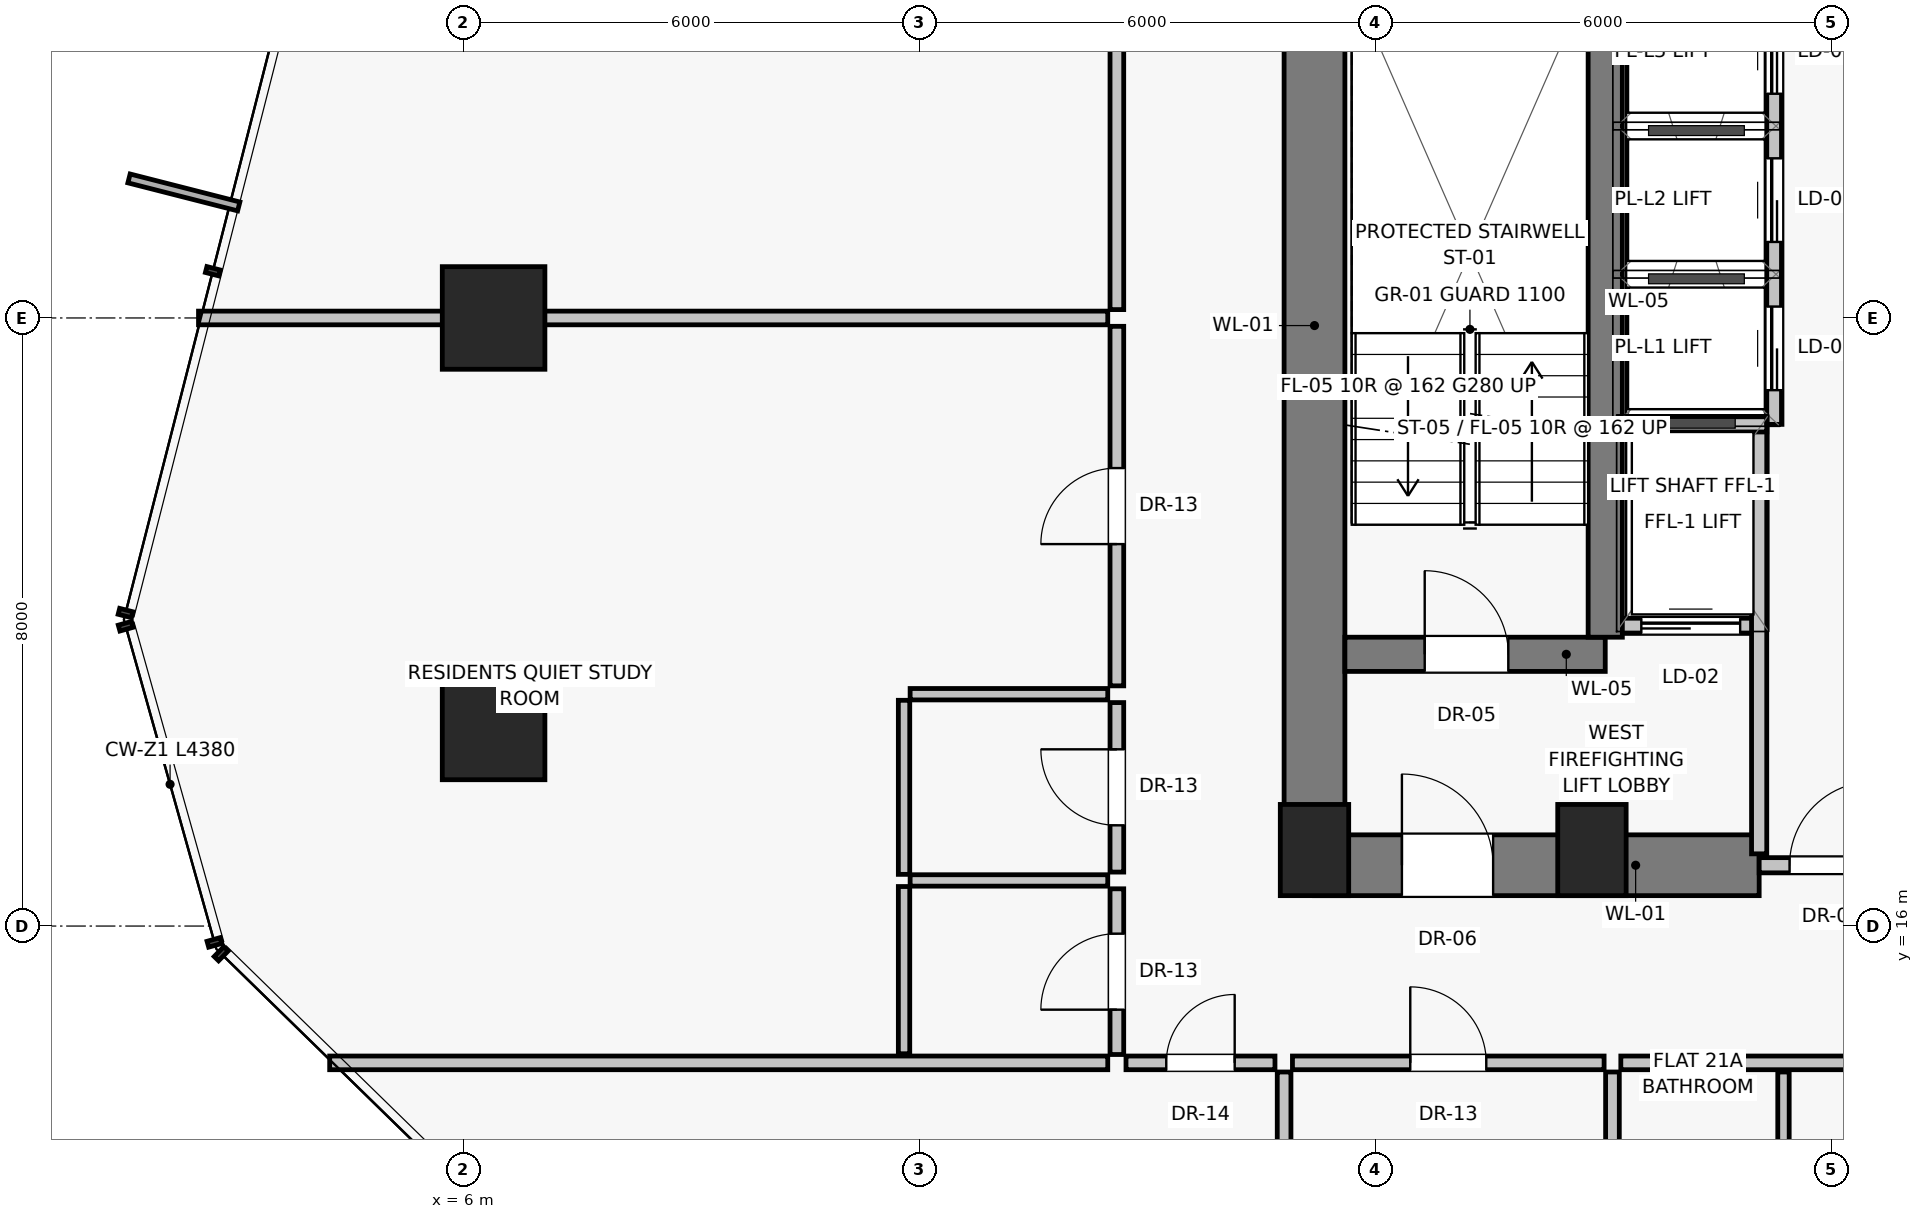
"""IFC4 building model, lengths in metres.
Left out: names, types, materials, properties, quantities, classifications, styles, units other than length and angle.
Written with IfcOpenShell. Run it as: python <this file> out.ifc"""

import sys

from ifc_helpers import new_model, si_unit, direction, frame, frame_2d, origin, origin_2d, place, context, subcontext, project, spatial, rectangle, extrude, source, transform, mapped, element, fill, save


model = new_model("IFC4")
c1 = context("Model", 3, precision=1e-05, world=origin(), true_north=direction((0.0, 1.0)))
c2 = subcontext(c1, "Body", "Model", "MODEL_VIEW")
j1 = project(units=[si_unit("LENGTHUNIT", "METRE"), si_unit("PLANEANGLEUNIT", "RADIAN")], contexts=[c1])
p1 = place(None, origin())
s1 = spatial("IfcSite", under=j1, at=p1, CompositionType="ELEMENT")
p2 = place(p1, origin())
s2 = spatial("IfcBuilding", under=s1, at=p2, CompositionType="ELEMENT")
p3 = place(p2, frame((0.0, 0.0, 77.1)))
s3 = spatial("IfcBuildingStorey", under=s2, at=p3, CompositionType="ELEMENT", Elevation=77.1)
for number, where, z_axis, x_axis in (
    (1, (17.2, 17.0, 0.0), (0.0, 0.0, 1.0), (1.0, 0.0, 0.0)),
    (2, (20.85, 17.0, 0.0), (0.0, 0.0, 1.0), (1.0, 0.0, 0.0)),
):
    element("IfcColumn", number, at=place(p3, frame(where, z_axis=z_axis, x_axis=x_axis)), inside=s3, PredefinedType="PILASTER", context=c2, shape_type="SweptSolid", body=[
        extrude(rectangle(XDim=0.9, YDim=1.2, at=origin_2d()), origin(), (0.0, 0.0, 1.0), 3.25),
    ])
for number, where, z_axis, x_axis in (
    (3, (6.4, 24.0, 0.0), (0.0, 0.0, 1.0), (1.0, 0.0, 0.0)),
    (4, (6.4, 18.6, 0.0), (0.0, 0.0, 1.0), (1.0, 0.0, 0.0)),
):
    element("IfcColumn", number, at=place(p3, frame(where, z_axis=z_axis, x_axis=x_axis)), inside=s3, PredefinedType="COLUMN", context=c2, shape_type="SweptSolid", body=[
        extrude(rectangle(XDim=1.35, YDim=1.35, at=origin_2d()), origin(), (0.0, 0.0, 1.0), 3.25),
    ])
p4 = place(p3, frame((17.2, 16.8, 0.0), z_axis=(0.0, 0.0, 1.0), x_axis=(0.0, 1.0, 0.0)))
e5 = element("IfcWall", 5, at=p4, inside=s3, PredefinedType="SHEAR", context=c2, shape_type="SweptSolid", body=[
    extrude(rectangle(XDim=14.2, YDim=0.8, at=frame_2d((7.1, 0.0))), origin(), (0.0, 0.0, 1.0), 2.93),
])
p5 = place(p3, frame((17.2, 16.8, 0.0), z_axis=(0.0, 0.0, 1.0), x_axis=(1.0, 0.0, 0.0)))
e6 = element("IfcWall", 6, at=p5, inside=s3, PredefinedType="SHEAR", context=c2, shape_type="SweptSolid", body=[
    extrude(rectangle(XDim=5.85, YDim=0.8, at=frame_2d((2.925, 0.0))), origin(), (0.0, 0.0, 1.0), 2.93),
])
p6 = place(p5, frame((1.15, 0.0, 0.0)))
e7 = element("IfcOpeningElement", 7, at=p6, cuts=e6, PredefinedType="OPENING", context=c2, shape_type="SweptSolid", body=[
    extrude(rectangle(XDim=1.2, YDim=2.03, at=frame_2d((0.6, 1.015))), frame((0.0, 0.41, 0.0), z_axis=(0.0, -1.0, 0.0), x_axis=(1.0, 0.0, 0.0)), (0.0, 0.0, 1.0), 0.82),
])
p7 = place(p3, frame((23.05, 16.8, 0.0), z_axis=(0.0, 0.0, 1.0), x_axis=(1.0, 0.0, 0.0)))
e8 = element("IfcWall", 8, at=p7, inside=s3, PredefinedType="SOLIDWALL", context=c2, shape_type="SweptSolid", body=[
    extrude(rectangle(XDim=1.9, YDim=0.2, at=frame_2d((0.95, 0.0))), origin(), (0.0, 0.0, 1.0), 2.08),
])
p8 = place(p7, frame((0.4, 0.0, 0.0)))
e9 = element("IfcOpeningElement", 9, at=p8, cuts=e8, PredefinedType="OPENING", context=c2, shape_type="SweptSolid", body=[
    extrude(rectangle(XDim=1.1, YDim=2.03, at=frame_2d((0.55, 1.015))), frame((0.0, 0.11, 0.0), z_axis=(0.0, -1.0, 0.0), x_axis=(1.0, 0.0, 0.0)), (0.0, 0.0, 1.0), 0.22),
])
p9 = place(p3, frame((17.6, 19.575, 0.0), z_axis=(0.0, 0.0, 1.0), x_axis=(1.0, 0.0, 0.0)))
e10 = element("IfcWall", 10, at=p9, inside=s3, PredefinedType="SHEAR", context=c2, shape_type="SweptSolid", body=[
    extrude(rectangle(XDim=3.425, YDim=0.45, at=frame_2d((1.712, 0.0))), origin(), (0.0, 0.0, 1.0), 2.93),
])
p10 = place(p9, frame((1.05, 0.0, 0.0)))
e11 = element("IfcOpeningElement", 11, at=p10, cuts=e10, PredefinedType="OPENING", context=c2, shape_type="SweptSolid", body=[
    extrude(rectangle(XDim=1.1, YDim=2.03, at=frame_2d((0.55, 1.015))), frame((0.0, 0.235, 0.0), z_axis=(0.0, -1.0, 0.0), x_axis=(1.0, 0.0, 0.0)), (0.0, 0.0, 1.0), 0.47),
])
p11 = place(p3, frame((21.2, 19.95, 0.0), z_axis=(0.0, 0.0, 1.0), x_axis=(1.0, 0.0, 0.0)))
e12 = element("IfcWall", 12, at=p11, inside=s3, PredefinedType="SOLIDWALL", context=c2, shape_type="SweptSolid", body=[
    extrude(rectangle(XDim=1.85, YDim=0.2, at=frame_2d((0.925, 0.0))), origin(), (0.0, 0.0, 1.0), 2.93),
])
p12 = place(p11, frame((0.3, 0.0, 0.0)))
e13 = element("IfcOpeningElement", 13, at=p12, cuts=e12, PredefinedType="OPENING", context=c2, shape_type="SweptSolid", body=[
    extrude(rectangle(XDim=1.3, YDim=2.25, at=frame_2d((0.65, 1.125))), frame((0.0, 0.11, 0.0), z_axis=(0.0, -1.0, 0.0), x_axis=(1.0, 0.0, 0.0)), (0.0, 0.0, 1.0), 0.22),
])
p13 = place(p3, frame((21.025, 19.8, 0.0), z_axis=(0.0, 0.0, 1.0), x_axis=(0.0, 1.0, 0.0)))
e14 = element("IfcWall", 14, at=p13, inside=s3, PredefinedType="SHEAR", context=c2, shape_type="SweptSolid", body=[
    extrude(rectangle(XDim=8.825, YDim=0.45, at=frame_2d((4.413, 0.0))), origin(), (0.0, 0.0, 1.0), 2.93),
])
p14 = place(p3, frame((23.05, 16.95, 0.0), z_axis=(0.0, 0.0, 1.0), x_axis=(0.0, 1.0, 0.0)))
e15 = element("IfcWall", 15, at=p14, inside=s3, PredefinedType="SOLIDWALL", context=c2, shape_type="SweptSolid", body=[
    extrude(rectangle(XDim=5.6, YDim=0.2, at=frame_2d((2.8, 0.0))), origin(), (0.0, 0.0, 1.0), 2.93),
])
p15 = place(p3, frame((21.2, 22.6, 0.0), z_axis=(0.0, 0.0, 1.0), x_axis=(1.0, 0.0, 0.0)))
e16 = element("IfcWall", 16, at=p15, inside=s3, PredefinedType="SOLIDWALL", context=c2, shape_type="SweptSolid", body=[
    extrude(rectangle(XDim=1.95, YDim=0.2, at=frame_2d((0.975, 0.0))), origin(), (0.0, 0.0, 1.0), 2.93),
])
p16 = place(p3, frame((23.25, 22.6, 0.0), z_axis=(0.0, 0.0, 1.0), x_axis=(0.0, 1.0, 0.0)))
e17 = element("IfcWall", 17, at=p16, inside=s3, PredefinedType="SOLIDWALL", context=c2, shape_type="SweptSolid", body=[
    extrude(rectangle(XDim=5.95, YDim=0.2, at=frame_2d((2.975, 0.0))), origin(), (0.0, 0.0, 1.0), 2.93),
])
p17 = place(p16, frame((0.45, 0.0, 0.0)))
e18 = element("IfcOpeningElement", 18, at=p17, cuts=e17, PredefinedType="OPENING", context=c2, shape_type="SweptSolid", body=[
    extrude(rectangle(XDim=1.1, YDim=2.08, at=frame_2d((0.55, 1.04))), frame((0.0, 0.11, 0.0), z_axis=(0.0, -1.0, 0.0), x_axis=(1.0, 0.0, 0.0)), (0.0, 0.0, 1.0), 0.22),
])
p18 = place(p16, frame((2.4, 0.0, 0.0)))
e19 = element("IfcOpeningElement", 19, at=p18, cuts=e17, PredefinedType="OPENING", context=c2, shape_type="SweptSolid", body=[
    extrude(rectangle(XDim=1.1, YDim=2.08, at=frame_2d((0.55, 1.04))), frame((0.0, 0.11, 0.0), z_axis=(0.0, -1.0, 0.0), x_axis=(1.0, 0.0, 0.0)), (0.0, 0.0, 1.0), 0.22),
])
p19 = place(p16, frame((4.35, 0.0, 0.0)))
e20 = element("IfcOpeningElement", 20, at=p19, cuts=e17, PredefinedType="OPENING", context=c2, shape_type="SweptSolid", body=[
    extrude(rectangle(XDim=1.1, YDim=2.08, at=frame_2d((0.55, 1.04))), frame((0.0, 0.11, 0.0), z_axis=(0.0, -1.0, 0.0), x_axis=(1.0, 0.0, 0.0)), (0.0, 0.0, 1.0), 0.22),
])
p20 = place(p3, frame((16.8, 14.08, 0.0), z_axis=(0.0, 0.0, 1.0), x_axis=(0.0, -1.0, 0.0)))
e21 = element("IfcWall", 21, at=p20, inside=s3, PredefinedType="PARTITIONING", context=c2, shape_type="SweptSolid", body=[
    extrude(rectangle(XDim=11.702, YDim=0.18, at=frame_2d((5.851, 0.0))), origin(), (0.0, 0.0, 1.0), 2.93),
])
p21 = place(p3, frame((16.91, 14.2, 0.0), z_axis=(0.0, 0.0, 1.0), x_axis=(1.0, 0.0, 0.0)))
e22 = element("IfcWall", 22, at=p21, inside=s3, PredefinedType="PARTITIONING", context=c2, shape_type="SweptSolid", body=[
    extrude(rectangle(XDim=4.1, YDim=0.18, at=frame_2d((2.05, 0.0))), origin(), (0.0, 0.0, 1.0), 2.93),
])
p22 = place(p21, frame((1.55, 0.0, 0.0)))
e23 = element("IfcOpeningElement", 23, at=p22, cuts=e22, PredefinedType="OPENING", context=c2, shape_type="SweptSolid", body=[
    extrude(rectangle(XDim=1.0, YDim=2.01, at=frame_2d((0.5, 1.005))), frame((0.0, 0.1, 0.0), z_axis=(0.0, -1.0, 0.0), x_axis=(1.0, 0.0, 0.0)), (0.0, 0.0, 1.0), 0.2),
])
p23 = place(p3, frame((21.23, 14.2, 0.0), z_axis=(0.0, 0.0, 1.0), x_axis=(1.0, 0.0, 0.0)))
e24 = element("IfcWall", 24, at=p23, inside=s3, PredefinedType="PARTITIONING", context=c2, shape_type="SweptSolid", body=[
    extrude(rectangle(XDim=9.86, YDim=0.18, at=frame_2d((4.93, 0.0))), origin(), (0.0, 0.0, 1.0), 2.93),
])
p24 = place(p23, frame((3.276, 0.0, 0.0)))
e25 = element("IfcOpeningElement", 25, at=p24, cuts=e24, PredefinedType="OPENING", context=c2, shape_type="SweptSolid", body=[
    extrude(rectangle(XDim=0.95, YDim=2.02, at=frame_2d((0.475, 1.01))), frame((0.0, 0.1, 0.0), z_axis=(0.0, -1.0, 0.0), x_axis=(1.0, 0.0, 0.0)), (0.0, 0.0, 1.0), 0.2),
])
p25 = place(p3, frame((21.12, 14.08, 0.0), z_axis=(0.0, 0.0, 1.0), x_axis=(0.0, -1.0, 0.0)))
e26 = element("IfcWall", 26, at=p25, inside=s3, PredefinedType="PARTITIONING", context=c2, shape_type="SweptSolid", body=[
    extrude(rectangle(XDim=1.8, YDim=0.18, at=frame_2d((0.9, 0.0))), origin(), (0.0, 0.0, 1.0), 2.93),
])
p26 = place(p3, frame((23.37, 14.08, 0.0), z_axis=(0.0, 0.0, 1.0), x_axis=(0.0, -1.0, 0.0)))
e27 = element("IfcWall", 27, at=p26, inside=s3, PredefinedType="PARTITIONING", context=c2, shape_type="SweptSolid", body=[
    extrude(rectangle(XDim=1.8, YDim=0.15, at=frame_2d((0.9, 0.0))), origin(), (0.0, 0.0, 1.0), 2.93),
])
p27 = place(p3, frame((14.48, 14.2, 0.0), z_axis=(0.0, 0.0, 1.0), x_axis=(-1.0, 0.0, 0.0)))
e28 = element("IfcWall", 28, at=p27, inside=s3, PredefinedType="PARTITIONING", context=c2, shape_type="SweptSolid", body=[
    extrude(rectangle(XDim=10.237, YDim=0.18, at=frame_2d((5.118, 0.0))), origin(), (0.0, 0.0, 1.0), 2.93),
])
p28 = place(p3, frame((14.6, 14.31, 0.0), z_axis=(0.0, 0.0, 1.0), x_axis=(0.0, 1.0, 0.0)))
e29 = element("IfcWall", 29, at=p28, inside=s3, PredefinedType="PARTITIONING", context=c2, shape_type="SweptSolid", body=[
    extrude(rectangle(XDim=2.18, YDim=0.18, at=frame_2d((1.09, 0.0))), origin(), (0.0, 0.0, 1.0), 2.93),
])
p29 = place(p28, frame((0.59, 0.0, 0.0)))
e30 = element("IfcOpeningElement", 30, at=p29, cuts=e29, PredefinedType="OPENING", context=c2, shape_type="SweptSolid", body=[
    extrude(rectangle(XDim=1.0, YDim=2.01, at=frame_2d((0.5, 1.005))), frame((0.0, 0.1, 0.0), z_axis=(0.0, -1.0, 0.0), x_axis=(1.0, 0.0, 0.0)), (0.0, 0.0, 1.0), 0.2),
])
p30 = place(p3, frame((14.6, 16.71, 0.0), z_axis=(0.0, 0.0, 1.0), x_axis=(0.0, 1.0, 0.0)))
e31 = element("IfcWall", 31, at=p30, inside=s3, PredefinedType="PARTITIONING", context=c2, shape_type="SweptSolid", body=[
    extrude(rectangle(XDim=2.23, YDim=0.18, at=frame_2d((1.115, 0.0))), origin(), (0.0, 0.0, 1.0), 2.93),
])
p31 = place(p30, frame((0.615, 0.0, 0.0)))
e32 = element("IfcOpeningElement", 32, at=p31, cuts=e31, PredefinedType="OPENING", context=c2, shape_type="SweptSolid", body=[
    extrude(rectangle(XDim=1.0, YDim=2.01, at=frame_2d((0.5, 1.005))), frame((0.0, 0.1, 0.0), z_axis=(0.0, -1.0, 0.0), x_axis=(1.0, 0.0, 0.0)), (0.0, 0.0, 1.0), 0.2),
])
p32 = place(p3, frame((14.6, 19.16, 0.0), z_axis=(0.0, 0.0, 1.0), x_axis=(0.0, 1.0, 0.0)))
e33 = element("IfcWall", 33, at=p32, inside=s3, PredefinedType="PARTITIONING", context=c2, shape_type="SweptSolid", body=[
    extrude(rectangle(XDim=4.73, YDim=0.18, at=frame_2d((2.365, 0.0))), origin(), (0.0, 0.0, 1.0), 2.93),
])
p33 = place(p32, frame((1.865, 0.0, 0.0)))
e34 = element("IfcOpeningElement", 34, at=p33, cuts=e33, PredefinedType="OPENING", context=c2, shape_type="SweptSolid", body=[
    extrude(rectangle(XDim=1.0, YDim=2.01, at=frame_2d((0.5, 1.005))), frame((0.0, 0.1, 0.0), z_axis=(0.0, -1.0, 0.0), x_axis=(1.0, 0.0, 0.0)), (0.0, 0.0, 1.0), 0.2),
])
p34 = place(p3, frame((14.6, 24.11, 0.0), z_axis=(0.0, 0.0, 1.0), x_axis=(0.0, 1.0, 0.0)))
e35 = element("IfcWall", 35, at=p34, inside=s3, PredefinedType="PARTITIONING", context=c2, shape_type="SweptSolid", body=[
    extrude(rectangle(XDim=9.38, YDim=0.18, at=frame_2d((4.69, 0.0))), origin(), (0.0, 0.0, 1.0), 2.93),
])
p35 = place(p34, frame((4.19, 0.0, 0.0)))
e36 = element("IfcOpeningElement", 36, at=p35, cuts=e35, PredefinedType="OPENING", context=c2, shape_type="SweptSolid", body=[
    extrude(rectangle(XDim=1.0, YDim=2.01, at=frame_2d((0.5, 1.005))), frame((0.0, 0.1, 0.0), z_axis=(0.0, -1.0, 0.0), x_axis=(1.0, 0.0, 0.0)), (0.0, 0.0, 1.0), 0.2),
])
for number, where, z_axis, x_axis in (
    (37, (14.48, 16.6, 0.0), (0.0, 0.0, 1.0), (-1.0, 0.0, 0.0)),
    (38, (14.48, 19.05, 0.0), (0.0, 0.0, 1.0), (-1.0, 0.0, 0.0)),
):
    element("IfcWall", number, at=place(p3, frame(where, z_axis=z_axis, x_axis=x_axis)), inside=s3, PredefinedType="PARTITIONING", context=c2, shape_type="SweptSolid", body=[
        extrude(rectangle(XDim=2.6, YDim=0.15, at=frame_2d((1.3, 0.0))), origin(), (0.0, 0.0, 1.0), 2.93),
    ])
p36 = place(p3, frame((11.8, 14.32, 0.0), z_axis=(0.0, 0.0, 1.0), x_axis=(0.0, 1.0, 0.0)))
e39 = element("IfcWall", 39, at=p36, inside=s3, PredefinedType="PARTITIONING", context=c2, shape_type="SweptSolid", body=[
    extrude(rectangle(XDim=2.2, YDim=0.15, at=frame_2d((1.1, 0.0))), origin(), (0.0, 0.0, 1.0), 2.93),
])
p37 = place(p3, frame((11.8, 16.68, 0.0), z_axis=(0.0, 0.0, 1.0), x_axis=(0.0, 1.0, 0.0)))
e40 = element("IfcWall", 40, at=p37, inside=s3, PredefinedType="PARTITIONING", context=c2, shape_type="SweptSolid", body=[
    extrude(rectangle(XDim=2.29, YDim=0.15, at=frame_2d((1.145, 0.0))), origin(), (0.0, 0.0, 1.0), 2.51),
])
p38 = place(p3, frame((14.48, 24.0, 0.0), z_axis=(0.0, 0.0, 1.0), x_axis=(-1.0, 0.0, 0.0)))
e41 = element("IfcWall", 41, at=p38, inside=s3, PredefinedType="PARTITIONING", context=c2, shape_type="SweptSolid", body=[
    extrude(rectangle(XDim=11.962, YDim=0.18, at=frame_2d((5.981, 0.0))), origin(), (0.0, 0.0, 1.0), 2.93),
])
p39 = place(p3, frame((14.72, 14.2, 0.0), z_axis=(0.0, 0.0, 1.0), x_axis=(1.0, 0.0, 0.0)))
e42 = element("IfcWall", 42, at=p39, inside=s3, PredefinedType="PARTITIONING", context=c2, shape_type="SweptSolid", body=[
    extrude(rectangle(XDim=1.96, YDim=0.18, at=frame_2d((0.98, 0.0))), origin(), (0.0, 0.0, 1.0), 2.93),
])
p40 = place(p39, frame((0.53, 0.0, 0.0)))
e43 = element("IfcOpeningElement", 43, at=p40, cuts=e42, PredefinedType="OPENING", context=c2, shape_type="SweptSolid", body=[
    extrude(rectangle(XDim=0.9, YDim=2.01, at=frame_2d((0.45, 1.005))), frame((0.0, 0.1, 0.0), z_axis=(0.0, -1.0, 0.0), x_axis=(1.0, 0.0, 0.0)), (0.0, 0.0, 1.0), 0.2),
])
m1 = source(origin(), c2, "Body", "SweptSolid", [
    extrude(rectangle(XDim=1.2, YDim=2.03, at=frame_2d((0.6, 1.015))), frame((0.0, 0.025, 0.0), z_axis=(0.0, -1.0, 0.0), x_axis=(1.0, 0.0, 0.0)), (0.0, 0.0, 1.0), 0.05),
])
p41 = place(p6, origin())
e44 = element("IfcDoor", 44, at=p41, inside=s3, OperationType="SINGLE_SWING_LEFT", PredefinedType="DOOR", context=c2, shape_type="MappedRepresentation", body=[
    mapped(m1, transform((0.0, 0.0, 0.0), scale=1.0)),
])
fill(e7, e44)
m2 = source(origin(), c2, "Body", "SweptSolid", [
    extrude(rectangle(XDim=1.1, YDim=2.03, at=frame_2d((0.55, 1.015))), frame((0.0, 0.025, 0.0), z_axis=(0.0, -1.0, 0.0), x_axis=(1.0, 0.0, 0.0)), (0.0, 0.0, 1.0), 0.05),
])
p42 = place(p8, origin())
e45 = element("IfcDoor", 45, at=p42, inside=s3, OperationType="SINGLE_SWING_RIGHT", PredefinedType="DOOR", context=c2, shape_type="MappedRepresentation", body=[
    mapped(m2, transform((0.0, 0.0, 0.0), scale=1.0)),
])
fill(e9, e45)
p43 = place(p10, origin())
e46 = element("IfcDoor", 46, at=p43, inside=s3, OperationType="SINGLE_SWING_LEFT", PredefinedType="DOOR", context=c2, shape_type="MappedRepresentation", body=[
    mapped(m2, transform((0.0, 0.0, 0.0), scale=1.0)),
])
fill(e11, e46)
m3 = source(origin(), c2, "Body", "SweptSolid", [
    extrude(rectangle(XDim=1.3, YDim=2.25, at=frame_2d((0.65, 1.125))), frame((0.0, 0.025, 0.0), z_axis=(0.0, -1.0, 0.0), x_axis=(1.0, 0.0, 0.0)), (0.0, 0.0, 1.0), 0.05),
])
p44 = place(p12, origin())
e47 = element("IfcDoor", 47, at=p44, inside=s3, OperationType="SLIDING_TO_LEFT", PredefinedType="DOOR", context=c2, shape_type="MappedRepresentation", body=[
    mapped(m3, transform((0.0, 0.0, 0.0), scale=1.0)),
])
fill(e13, e47)
m4 = source(origin(), c2, "Body", "SweptSolid", [
    extrude(rectangle(XDim=1.1, YDim=2.08, at=frame_2d((0.55, 1.04))), frame((0.0, 0.025, 0.0), z_axis=(0.0, -1.0, 0.0), x_axis=(1.0, 0.0, 0.0)), (0.0, 0.0, 1.0), 0.05),
])
p45 = place(p17, origin())
e48 = element("IfcDoor", 48, at=p45, inside=s3, OperationType="SLIDING_TO_LEFT", PredefinedType="DOOR", context=c2, shape_type="MappedRepresentation", body=[
    mapped(m4, transform((0.0, 0.0, 0.0), scale=1.0)),
])
fill(e18, e48)
p46 = place(p18, origin())
e49 = element("IfcDoor", 49, at=p46, inside=s3, OperationType="SLIDING_TO_LEFT", PredefinedType="DOOR", context=c2, shape_type="MappedRepresentation", body=[
    mapped(m4, transform((0.0, 0.0, 0.0), scale=1.0)),
])
fill(e19, e49)
p47 = place(p19, origin())
e50 = element("IfcDoor", 50, at=p47, inside=s3, OperationType="SLIDING_TO_LEFT", PredefinedType="DOOR", context=c2, shape_type="MappedRepresentation", body=[
    mapped(m4, transform((0.0, 0.0, 0.0), scale=1.0)),
])
fill(e20, e50)
m5 = source(origin(), c2, "Body", "SweptSolid", [
    extrude(rectangle(XDim=1.0, YDim=2.01, at=frame_2d((0.5, 1.005))), frame((0.0, 0.025, 0.0), z_axis=(0.0, -1.0, 0.0), x_axis=(1.0, 0.0, 0.0)), (0.0, 0.0, 1.0), 0.05),
])
p48 = place(p22, origin())
e51 = element("IfcDoor", 51, at=p48, inside=s3, OperationType="SINGLE_SWING_LEFT", PredefinedType="DOOR", context=c2, shape_type="MappedRepresentation", body=[
    mapped(m5, transform((0.0, 0.0, 0.0), scale=1.0)),
])
fill(e23, e51)
p49 = place(p29, origin())
e52 = element("IfcDoor", 52, at=p49, inside=s3, OperationType="SINGLE_SWING_LEFT", PredefinedType="DOOR", context=c2, shape_type="MappedRepresentation", body=[
    mapped(m5, transform((0.0, 0.0, 0.0), scale=1.0)),
])
fill(e30, e52)
p50 = place(p31, origin())
e53 = element("IfcDoor", 53, at=p50, inside=s3, OperationType="SINGLE_SWING_RIGHT", PredefinedType="DOOR", context=c2, shape_type="MappedRepresentation", body=[
    mapped(m5, transform((0.0, 0.0, 0.0), scale=1.0)),
])
fill(e32, e53)
p51 = place(p33, origin())
e54 = element("IfcDoor", 54, at=p51, inside=s3, OperationType="SINGLE_SWING_LEFT", PredefinedType="DOOR", context=c2, shape_type="MappedRepresentation", body=[
    mapped(m5, transform((0.0, 0.0, 0.0), scale=1.0)),
])
fill(e34, e54)
m6 = source(origin(), c2, "Body", "SweptSolid", [
    extrude(rectangle(XDim=0.9, YDim=2.01, at=frame_2d((0.45, 1.005))), frame((0.0, 0.025, 0.0), z_axis=(0.0, -1.0, 0.0), x_axis=(1.0, 0.0, 0.0)), (0.0, 0.0, 1.0), 0.05),
])
p52 = place(p40, origin())
e55 = element("IfcDoor", 55, at=p52, inside=s3, OperationType="SINGLE_SWING_RIGHT", PredefinedType="DOOR", context=c2, shape_type="MappedRepresentation", body=[
    mapped(m6, transform((0.0, 0.0, 0.0), scale=1.0)),
])
fill(e43, e55)
save(model, sys.argv[1])
